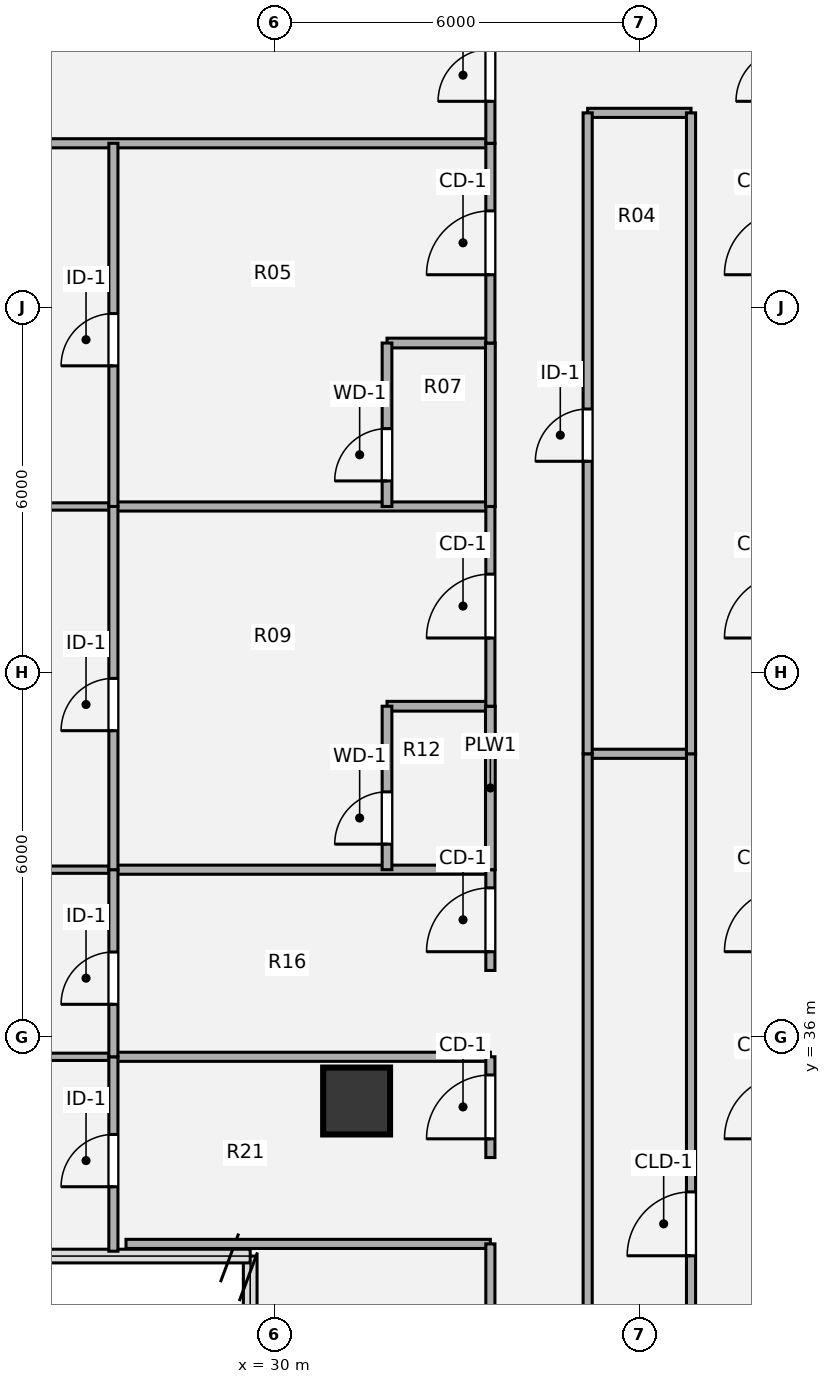
"""IFC4 building model, lengths in metres.
Left out: names, types, materials, properties, quantities, classifications, styles, units other than length and angle.
Written with IfcOpenShell. Run it as: python <this file> out.ifc"""

import sys

from ifc_helpers import new_model, si_unit, direction, frame, frame_2d, origin, origin_2d, place, context, subcontext, project, spatial, rectangle, hollow_circle, extrude, source, transform, mapped, element, fill, save


model = new_model("IFC4")
c1 = context("Model", 3, precision=1e-05, world=origin(), true_north=direction((0.0, 1.0)))
c2 = subcontext(c1, "Body", "Model", "MODEL_VIEW")
j1 = project(units=[si_unit("LENGTHUNIT", "METRE"), si_unit("PLANEANGLEUNIT", "RADIAN")], contexts=[c1])
p1 = place(None, origin())
s1 = spatial("IfcSite", under=j1, at=p1, CompositionType="ELEMENT")
p2 = place(p1, origin())
s2 = spatial("IfcBuilding", under=s1, at=p2, CompositionType="ELEMENT")
p3 = place(p2, frame((0.0, 0.0, 167.76)))
s3 = spatial("IfcBuildingStorey", under=s2, at=p3, CompositionType="ELEMENT", Elevation=167.76)
m1 = source(origin(), c2, "Body", "SweptSolid", [
    extrude(hollow_circle(Radius=0.55, WallThickness=0.04, at=origin_2d()), origin(), (0.0, 0.0, 1.0), 3.78),
])
p4 = place(p3, frame((31.35, 34.95, 0.0), z_axis=(0.0, 0.0, 1.0), x_axis=(1.0, 0.0, 0.0)))
e1 = element("IfcColumn", 1, at=p4, inside=s3, PredefinedType="COLUMN", context=c2, shape_type="MappedRepresentation", body=[
    mapped(m1, transform((0.0, 0.0, 0.0), x_axis=(1.0, 0.0, 0.0), y_axis=(0.0, 1.0, 0.0), z_axis=(0.0, 0.0, 1.0), scale=1.0)),
])
p5 = place(p3, frame((27.557, 32.6, 0.0), z_axis=(0.0, 0.0, 1.0), x_axis=(1.0, 0.0, 0.0)))
e2 = element("IfcWall", 2, at=p5, inside=s3, PredefinedType="PARTITIONING", context=c2, shape_type="SweptSolid", body=[
    extrude(rectangle(XDim=5.993, YDim=0.15, at=frame_2d((2.997, 0.0))), origin(), (0.0, 0.0, 1.0), 3.5),
])
p6 = place(p3, frame((15.88, 35.677, 0.0), z_axis=(0.0, 0.0, 1.0), x_axis=(1.0, 0.0, 0.0)))
e3 = element("IfcWall", 3, at=p6, inside=s3, PredefinedType="PARTITIONING", context=c2, shape_type="SweptSolid", body=[
    extrude(rectangle(XDim=11.47, YDim=0.12, at=frame_2d((5.735, 0.0))), origin(), (0.0, 0.0, 1.0), 2.982),
])
p7 = place(p3, frame((27.35, 35.677, 0.0), z_axis=(0.0, 0.0, 1.0), x_axis=(1.0, 0.0, 0.0)))
e4 = element("IfcWall", 4, at=p7, inside=s3, PredefinedType="PARTITIONING", context=c2, shape_type="SweptSolid", body=[
    extrude(rectangle(XDim=6.2, YDim=0.15, at=frame_2d((3.1, 0.0))), origin(), (0.0, 0.0, 1.0), 2.982),
])
p8 = place(p3, frame((15.88, 38.754, 0.0), z_axis=(0.0, 0.0, 1.0), x_axis=(1.0, 0.0, 0.0)))
e5 = element("IfcWall", 5, at=p8, inside=s3, PredefinedType="PARTITIONING", context=c2, shape_type="SweptSolid", body=[
    extrude(rectangle(XDim=11.47, YDim=0.12, at=frame_2d((5.735, 0.0))), origin(), (0.0, 0.0, 1.0), 2.982),
])
p9 = place(p3, frame((27.35, 38.754, 0.0), z_axis=(0.0, 0.0, 1.0), x_axis=(1.0, 0.0, 0.0)))
e6 = element("IfcWall", 6, at=p9, inside=s3, PredefinedType="PARTITIONING", context=c2, shape_type="SweptSolid", body=[
    extrude(rectangle(XDim=6.2, YDim=0.15, at=frame_2d((3.1, 0.0))), origin(), (0.0, 0.0, 1.0), 2.982),
])
p10 = place(p3, frame((35.15, 40.66, 0.0), z_axis=(0.0, 0.0, 1.0), x_axis=(1.0, 0.0, 0.0)))
e7 = element("IfcWall", 7, at=p10, inside=s3, PredefinedType="PARTITIONING", context=c2, shape_type="SweptSolid", body=[
    extrude(rectangle(XDim=1.7, YDim=0.15, at=frame_2d((0.85, 0.0))), origin(), (0.0, 0.0, 1.0), 3.259),
])
p11 = place(p3, frame((31.85, 41.442, 0.0), z_axis=(0.0, 0.0, 1.0), x_axis=(1.0, 0.0, 0.0)))
e8 = element("IfcWall", 8, at=p11, inside=s3, PredefinedType="PLUMBINGWALL", context=c2, shape_type="SweptSolid", body=[
    extrude(rectangle(XDim=1.7, YDim=0.16, at=frame_2d((0.85, 0.0))), origin(), (0.0, 0.0, 1.0), 3.259),
])
p12 = place(p3, frame((15.88, 44.727, 0.0), z_axis=(0.0, 0.0, 1.0), x_axis=(1.0, 0.0, 0.0)))
e9 = element("IfcWall", 9, at=p12, inside=s3, PredefinedType="PARTITIONING", context=c2, shape_type="SweptSolid", body=[
    extrude(rectangle(XDim=11.47, YDim=0.12, at=frame_2d((5.735, 0.0))), origin(), (0.0, 0.0, 1.0), 3.055),
])
p13 = place(p3, frame((27.35, 44.727, 0.0), z_axis=(0.0, 0.0, 1.0), x_axis=(1.0, 0.0, 0.0)))
e10 = element("IfcWall", 10, at=p13, inside=s3, PredefinedType="PARTITIONING", context=c2, shape_type="SweptSolid", body=[
    extrude(rectangle(XDim=6.2, YDim=0.15, at=frame_2d((3.1, 0.0))), origin(), (0.0, 0.0, 1.0), 3.055),
])
p14 = place(p3, frame((31.85, 47.415, 0.0), z_axis=(0.0, 0.0, 1.0), x_axis=(1.0, 0.0, 0.0)))
e11 = element("IfcWall", 11, at=p14, inside=s3, PredefinedType="PLUMBINGWALL", context=c2, shape_type="SweptSolid", body=[
    extrude(rectangle(XDim=1.7, YDim=0.16, at=frame_2d((0.85, 0.0))), origin(), (0.0, 0.0, 1.0), 3.259),
])
p15 = place(p3, frame((15.981, 50.7, 0.0), z_axis=(0.0, 0.0, 1.0), x_axis=(1.0, 0.0, 0.0)))
e12 = element("IfcWall", 12, at=p15, inside=s3, PredefinedType="PARTITIONING", context=c2, shape_type="SweptSolid", body=[
    extrude(rectangle(XDim=17.569, YDim=0.15, at=frame_2d((8.785, 0.0))), origin(), (0.0, 0.0, 1.0), 3.308),
])
p16 = place(p3, frame((35.15, 51.2, 0.0), z_axis=(0.0, 0.0, 1.0), x_axis=(1.0, 0.0, 0.0)))
e13 = element("IfcWall", 13, at=p16, inside=s3, PredefinedType="PARTITIONING", context=c2, shape_type="SweptSolid", body=[
    extrude(rectangle(XDim=1.7, YDim=0.15, at=frame_2d((0.85, 0.0))), origin(), (0.0, 0.0, 1.0), 3.308),
])
p17 = place(p3, frame((27.35, 32.48, 0.0), z_axis=(0.0, 0.0, 1.0), x_axis=(0.0, 1.0, 0.0)))
e14 = element("IfcWall", 14, at=p17, inside=s3, PredefinedType="PARTITIONING", context=c2, shape_type="SweptSolid", body=[
    extrude(rectangle(XDim=3.197, YDim=0.15, at=frame_2d((1.599, 0.0))), origin(), (0.0, 0.0, 1.0), 3.5),
])
p18 = place(p17, frame((1.06, 0.0, 0.0)))
e15 = element("IfcOpeningElement", 15, at=p18, cuts=e14, PredefinedType="OPENING", context=c2, shape_type="SweptSolid", body=[
    extrude(rectangle(XDim=0.86, YDim=2.1, at=origin_2d()), frame((0.43, 0.085, 1.05), z_axis=(0.0, -1.0, 0.0), x_axis=(1.0, 0.0, 0.0)), (0.0, 0.0, 1.0), 0.17),
])
p19 = place(p3, frame((27.35, 35.677, 0.0), z_axis=(0.0, 0.0, 1.0), x_axis=(0.0, 1.0, 0.0)))
e16 = element("IfcWall", 16, at=p19, inside=s3, PredefinedType="PARTITIONING", context=c2, shape_type="SweptSolid", body=[
    extrude(rectangle(XDim=3.077, YDim=0.15, at=frame_2d((1.539, 0.0))), origin(), (0.0, 0.0, 1.0), 3.5),
])
p20 = place(p19, frame((0.863, 0.0, 0.0)))
e17 = element("IfcOpeningElement", 17, at=p20, cuts=e16, PredefinedType="OPENING", context=c2, shape_type="SweptSolid", body=[
    extrude(rectangle(XDim=0.86, YDim=2.1, at=origin_2d()), frame((0.43, 0.085, 1.05), z_axis=(0.0, -1.0, 0.0), x_axis=(1.0, 0.0, 0.0)), (0.0, 0.0, 1.0), 0.17),
])
p21 = place(p3, frame((27.35, 38.754, 0.0), z_axis=(0.0, 0.0, 1.0), x_axis=(0.0, 1.0, 0.0)))
e18 = element("IfcWall", 18, at=p21, inside=s3, PredefinedType="PARTITIONING", context=c2, shape_type="SweptSolid", body=[
    extrude(rectangle(XDim=5.973, YDim=0.15, at=frame_2d((2.987, 0.0))), origin(), (0.0, 0.0, 1.0), 3.5),
])
p22 = place(p21, frame((2.286, 0.0, 0.0)))
e19 = element("IfcOpeningElement", 19, at=p22, cuts=e18, PredefinedType="OPENING", context=c2, shape_type="SweptSolid", body=[
    extrude(rectangle(XDim=0.86, YDim=2.1, at=origin_2d()), frame((0.43, 0.085, 1.05), z_axis=(0.0, -1.0, 0.0), x_axis=(1.0, 0.0, 0.0)), (0.0, 0.0, 1.0), 0.17),
])
p23 = place(p3, frame((27.35, 44.727, 0.0), z_axis=(0.0, 0.0, 1.0), x_axis=(0.0, 1.0, 0.0)))
e20 = element("IfcWall", 20, at=p23, inside=s3, PredefinedType="PARTITIONING", context=c2, shape_type="SweptSolid", body=[
    extrude(rectangle(XDim=5.973, YDim=0.15, at=frame_2d((2.986, 0.0))), origin(), (0.0, 0.0, 1.0), 3.5),
])
p24 = place(p23, frame((2.313, 0.0, 0.0)))
e21 = element("IfcOpeningElement", 21, at=p24, cuts=e20, PredefinedType="OPENING", context=c2, shape_type="SweptSolid", body=[
    extrude(rectangle(XDim=0.86, YDim=2.1, at=origin_2d()), frame((0.43, 0.085, 1.05), z_axis=(0.0, -1.0, 0.0), x_axis=(1.0, 0.0, 0.0)), (0.0, 0.0, 1.0), 0.17),
])
p25 = place(p3, frame((31.85, 38.754, 0.0), z_axis=(0.0, 0.0, 1.0), x_axis=(0.0, 1.0, 0.0)))
e22 = element("IfcWall", 22, at=p25, inside=s3, PredefinedType="PLUMBINGWALL", context=c2, shape_type="SweptSolid", body=[
    extrude(rectangle(XDim=2.688, YDim=0.16, at=frame_2d((1.344, 0.0))), origin(), (0.0, 0.0, 1.0), 3.5),
])
p26 = place(p25, frame((0.42, 0.0, 0.0)))
e23 = element("IfcOpeningElement", 23, at=p26, cuts=e22, PredefinedType="OPENING", context=c2, shape_type="SweptSolid", body=[
    extrude(rectangle(XDim=0.86, YDim=2.1, at=origin_2d()), frame((0.43, 0.09, 1.05), z_axis=(0.0, -1.0, 0.0), x_axis=(1.0, 0.0, 0.0)), (0.0, 0.0, 1.0), 0.18),
])
p27 = place(p3, frame((31.85, 44.727, 0.0), z_axis=(0.0, 0.0, 1.0), x_axis=(0.0, 1.0, 0.0)))
e24 = element("IfcWall", 24, at=p27, inside=s3, PredefinedType="PLUMBINGWALL", context=c2, shape_type="SweptSolid", body=[
    extrude(rectangle(XDim=2.688, YDim=0.16, at=frame_2d((1.344, 0.0))), origin(), (0.0, 0.0, 1.0), 3.5),
])
p28 = place(p27, frame((0.42, 0.0, 0.0)))
e25 = element("IfcOpeningElement", 25, at=p28, cuts=e24, PredefinedType="OPENING", context=c2, shape_type="SweptSolid", body=[
    extrude(rectangle(XDim=0.86, YDim=2.1, at=origin_2d()), frame((0.43, 0.09, 1.05), z_axis=(0.0, -1.0, 0.0), x_axis=(1.0, 0.0, 0.0)), (0.0, 0.0, 1.0), 0.18),
])
p29 = place(p3, frame((33.55, 22.8, 0.0), z_axis=(0.0, 0.0, 1.0), x_axis=(0.0, 1.0, 0.0)))
e26 = element("IfcWall", 26, at=p29, inside=s3, PredefinedType="PARTITIONING", context=c2, shape_type="SweptSolid", body=[
    extrude(rectangle(XDim=9.8, YDim=0.15, at=frame_2d((4.9, 0.0))), origin(), (0.0, 0.0, 1.0), 3.5),
])
p30 = place(p29, frame((4.34, 0.0, 0.0)))
e27 = element("IfcOpeningElement", 27, at=p30, cuts=e26, PredefinedType="OPENING", context=c2, shape_type="SweptSolid", body=[
    extrude(rectangle(XDim=0.86, YDim=2.1, at=origin_2d()), frame((0.43, 0.085, 1.05), z_axis=(0.0, -1.0, 0.0), x_axis=(1.0, 0.0, 0.0)), (0.0, 0.0, 1.0), 0.17),
])
p31 = place(p3, frame((33.55, 34.02, 0.0), z_axis=(0.0, 0.0, 1.0), x_axis=(0.0, 1.0, 0.0)))
e28 = element("IfcWall", 28, at=p31, inside=s3, PredefinedType="PARTITIONING", context=c2, shape_type="SweptSolid", body=[
    extrude(rectangle(XDim=1.657, YDim=0.15, at=frame_2d((0.829, 0.0))), origin(), (0.0, 0.0, 1.0), 3.5),
])
p32 = place(p31, frame((0.308, 0.0, 0.0)))
e29 = element("IfcOpeningElement", 29, at=p32, cuts=e28, PredefinedType="OPENING", context=c2, shape_type="SweptSolid", body=[
    extrude(rectangle(XDim=1.05, YDim=2.1, at=origin_2d()), frame((0.525, 0.085, 1.05), z_axis=(0.0, -1.0, 0.0), x_axis=(1.0, 0.0, 0.0)), (0.0, 0.0, 1.0), 0.17),
])
p33 = place(p3, frame((33.55, 37.097, 0.0), z_axis=(0.0, 0.0, 1.0), x_axis=(0.0, 1.0, 0.0)))
e30 = element("IfcWall", 30, at=p33, inside=s3, PredefinedType="PARTITIONING", context=c2, shape_type="SweptSolid", body=[
    extrude(rectangle(XDim=1.657, YDim=0.15, at=frame_2d((0.829, 0.0))), origin(), (0.0, 0.0, 1.0), 3.5),
])
p34 = place(p33, frame((0.308, 0.0, 0.0)))
e31 = element("IfcOpeningElement", 31, at=p34, cuts=e30, PredefinedType="OPENING", context=c2, shape_type="SweptSolid", body=[
    extrude(rectangle(XDim=1.05, YDim=2.1, at=origin_2d()), frame((0.525, 0.085, 1.05), z_axis=(0.0, -1.0, 0.0), x_axis=(1.0, 0.0, 0.0)), (0.0, 0.0, 1.0), 0.17),
])
p35 = place(p3, frame((33.55, 38.754, 0.0), z_axis=(0.0, 0.0, 1.0), x_axis=(0.0, 1.0, 0.0)))
e32 = element("IfcWall", 32, at=p35, inside=s3, PredefinedType="PLUMBINGWALL", context=c2, shape_type="SweptSolid", body=[
    extrude(rectangle(XDim=2.688, YDim=0.16, at=frame_2d((1.344, 0.0))), origin(), (0.0, 0.0, 1.0), 3.5),
])
p36 = place(p3, frame((33.55, 41.442, 0.0), z_axis=(0.0, 0.0, 1.0), x_axis=(0.0, 1.0, 0.0)))
e33 = element("IfcWall", 33, at=p36, inside=s3, PredefinedType="PARTITIONING", context=c2, shape_type="SweptSolid", body=[
    extrude(rectangle(XDim=3.285, YDim=0.15, at=frame_2d((1.643, 0.0))), origin(), (0.0, 0.0, 1.0), 3.5),
])
p37 = place(p36, frame((1.122, 0.0, 0.0)))
e34 = element("IfcOpeningElement", 34, at=p37, cuts=e33, PredefinedType="OPENING", context=c2, shape_type="SweptSolid", body=[
    extrude(rectangle(XDim=1.05, YDim=2.1, at=origin_2d()), frame((0.525, 0.085, 1.05), z_axis=(0.0, -1.0, 0.0), x_axis=(1.0, 0.0, 0.0)), (0.0, 0.0, 1.0), 0.17),
])
p38 = place(p3, frame((33.55, 44.727, 0.0), z_axis=(0.0, 0.0, 1.0), x_axis=(0.0, 1.0, 0.0)))
e35 = element("IfcWall", 35, at=p38, inside=s3, PredefinedType="PLUMBINGWALL", context=c2, shape_type="SweptSolid", body=[
    extrude(rectangle(XDim=2.688, YDim=0.16, at=frame_2d((1.344, 0.0))), origin(), (0.0, 0.0, 1.0), 3.5),
])
p39 = place(p3, frame((33.55, 47.415, 0.0), z_axis=(0.0, 0.0, 1.0), x_axis=(0.0, 1.0, 0.0)))
e36 = element("IfcWall", 36, at=p39, inside=s3, PredefinedType="PARTITIONING", context=c2, shape_type="SweptSolid", body=[
    extrude(rectangle(XDim=3.285, YDim=0.15, at=frame_2d((1.643, 0.0))), origin(), (0.0, 0.0, 1.0), 3.5),
])
p40 = place(p39, frame((1.123, 0.0, 0.0)))
e37 = element("IfcOpeningElement", 37, at=p40, cuts=e36, PredefinedType="OPENING", context=c2, shape_type="SweptSolid", body=[
    extrude(rectangle(XDim=1.05, YDim=2.1, at=origin_2d()), frame((0.525, 0.085, 1.05), z_axis=(0.0, -1.0, 0.0), x_axis=(1.0, 0.0, 0.0)), (0.0, 0.0, 1.0), 0.17),
])
p41 = place(p3, frame((33.55, 50.7, 0.0), z_axis=(0.0, 0.0, 1.0), x_axis=(0.0, 1.0, 0.0)))
e38 = element("IfcWall", 38, at=p41, inside=s3, PredefinedType="PARTITIONING", context=c2, shape_type="SweptSolid", body=[
    extrude(rectangle(XDim=2.3, YDim=0.15, at=frame_2d((1.15, 0.0))), origin(), (0.0, 0.0, 1.0), 3.5),
])
p42 = place(p41, frame((0.69, 0.0, 0.0)))
e39 = element("IfcOpeningElement", 39, at=p42, cuts=e38, PredefinedType="OPENING", context=c2, shape_type="SweptSolid", body=[
    extrude(rectangle(XDim=0.86, YDim=2.1, at=origin_2d()), frame((0.43, 0.085, 1.05), z_axis=(0.0, -1.0, 0.0), x_axis=(1.0, 0.0, 0.0)), (0.0, 0.0, 1.0), 0.17),
])
p43 = place(p3, frame((35.15, 25.2, 0.0), z_axis=(0.0, 0.0, 1.0), x_axis=(0.0, 1.0, 0.0)))
e40 = element("IfcWall", 40, at=p43, inside=s3, PredefinedType="PARTITIONING", context=c2, shape_type="SweptSolid", body=[
    extrude(rectangle(XDim=15.46, YDim=0.15, at=frame_2d((7.73, 0.0))), origin(), (0.0, 0.0, 1.0), 3.5),
])
p44 = place(p3, frame((35.15, 40.66, 0.0), z_axis=(0.0, 0.0, 1.0), x_axis=(0.0, 1.0, 0.0)))
e41 = element("IfcWall", 41, at=p44, inside=s3, PredefinedType="PARTITIONING", context=c2, shape_type="SweptSolid", body=[
    extrude(rectangle(XDim=10.54, YDim=0.15, at=frame_2d((5.27, 0.0))), origin(), (0.0, 0.0, 1.0), 3.5),
])
p45 = place(p44, frame((4.81, 0.0, 0.0)))
e42 = element("IfcOpeningElement", 42, at=p45, cuts=e41, PredefinedType="OPENING", context=c2, shape_type="SweptSolid", body=[
    extrude(rectangle(XDim=0.86, YDim=2.1, at=origin_2d()), frame((0.43, 0.085, 1.05), z_axis=(0.0, -1.0, 0.0), x_axis=(1.0, 0.0, 0.0)), (0.0, 0.0, 1.0), 0.17),
])
p46 = place(p3, frame((36.85, 25.2, 0.0), z_axis=(0.0, 0.0, 1.0), x_axis=(0.0, 1.0, 0.0)))
e43 = element("IfcWall", 43, at=p46, inside=s3, PredefinedType="PARTITIONING", context=c2, shape_type="SweptSolid", body=[
    extrude(rectangle(XDim=15.46, YDim=0.15, at=frame_2d((7.73, 0.0))), origin(), (0.0, 0.0, 1.0), 3.5),
])
p47 = place(p46, frame((7.205, 0.0, 0.0)))
e44 = element("IfcOpeningElement", 44, at=p47, cuts=e43, PredefinedType="OPENING", context=c2, shape_type="SweptSolid", body=[
    extrude(rectangle(XDim=1.05, YDim=2.1, at=origin_2d()), frame((0.525, 0.085, 1.05), z_axis=(0.0, -1.0, 0.0), x_axis=(1.0, 0.0, 0.0)), (0.0, 0.0, 1.0), 0.17),
])
p48 = place(p3, frame((36.85, 40.66, 0.0), z_axis=(0.0, 0.0, 1.0), x_axis=(0.0, 1.0, 0.0)))
e45 = element("IfcWall", 45, at=p48, inside=s3, PredefinedType="PARTITIONING", context=c2, shape_type="SweptSolid", body=[
    extrude(rectangle(XDim=10.54, YDim=0.15, at=frame_2d((5.27, 0.0))), origin(), (0.0, 0.0, 1.0), 3.5),
])
m2 = source(origin(), c2, "Body", "SweptSolid", [
    extrude(rectangle(XDim=0.86, YDim=2.1, at=origin_2d()), frame((0.43, 0.025, 1.05), z_axis=(0.0, -1.0, 0.0), x_axis=(1.0, 0.0, 0.0)), (0.0, 0.0, 1.0), 0.05),
])
p49 = place(p18, origin())
e46 = element("IfcDoor", 46, at=p49, inside=s3, OperationType="SINGLE_SWING_LEFT", PredefinedType="DOOR", context=c2, shape_type="MappedRepresentation", body=[
    mapped(m2, transform((0.0, 0.0, 0.0), x_axis=(1.0, 0.0, 0.0), y_axis=(0.0, 1.0, 0.0), z_axis=(0.0, 0.0, 1.0), scale=1.0)),
])
fill(e15, e46)
p50 = place(p20, origin())
e47 = element("IfcDoor", 47, at=p50, inside=s3, OperationType="SINGLE_SWING_LEFT", PredefinedType="DOOR", context=c2, shape_type="MappedRepresentation", body=[
    mapped(m2, transform((0.0, 0.0, 0.0), x_axis=(1.0, 0.0, 0.0), y_axis=(0.0, 1.0, 0.0), z_axis=(0.0, 0.0, 1.0), scale=1.0)),
])
fill(e17, e47)
p51 = place(p22, origin())
e48 = element("IfcDoor", 48, at=p51, inside=s3, OperationType="SINGLE_SWING_LEFT", PredefinedType="DOOR", context=c2, shape_type="MappedRepresentation", body=[
    mapped(m2, transform((0.0, 0.0, 0.0), x_axis=(1.0, 0.0, 0.0), y_axis=(0.0, 1.0, 0.0), z_axis=(0.0, 0.0, 1.0), scale=1.0)),
])
fill(e19, e48)
p52 = place(p24, origin())
e49 = element("IfcDoor", 49, at=p52, inside=s3, OperationType="SINGLE_SWING_LEFT", PredefinedType="DOOR", context=c2, shape_type="MappedRepresentation", body=[
    mapped(m2, transform((0.0, 0.0, 0.0), x_axis=(1.0, 0.0, 0.0), y_axis=(0.0, 1.0, 0.0), z_axis=(0.0, 0.0, 1.0), scale=1.0)),
])
fill(e21, e49)
m3 = source(origin(), c2, "Body", "SweptSolid", [
    extrude(rectangle(XDim=0.86, YDim=2.1, at=origin_2d()), frame((0.43, 0.025, 1.05), z_axis=(0.0, -1.0, 0.0), x_axis=(1.0, 0.0, 0.0)), (0.0, 0.0, 1.0), 0.05),
])
p53 = place(p26, origin())
e50 = element("IfcDoor", 50, at=p53, inside=s3, OperationType="SINGLE_SWING_LEFT", PredefinedType="DOOR", context=c2, shape_type="MappedRepresentation", body=[
    mapped(m3, transform((0.0, 0.0, 0.0), x_axis=(1.0, 0.0, 0.0), y_axis=(0.0, 1.0, 0.0), z_axis=(0.0, 0.0, 1.0), scale=1.0)),
])
fill(e23, e50)
p54 = place(p28, origin())
e51 = element("IfcDoor", 51, at=p54, inside=s3, OperationType="SINGLE_SWING_LEFT", PredefinedType="DOOR", context=c2, shape_type="MappedRepresentation", body=[
    mapped(m3, transform((0.0, 0.0, 0.0), x_axis=(1.0, 0.0, 0.0), y_axis=(0.0, 1.0, 0.0), z_axis=(0.0, 0.0, 1.0), scale=1.0)),
])
fill(e25, e51)
m4 = source(origin(), c2, "Body", "SweptSolid", [
    extrude(rectangle(XDim=1.05, YDim=2.1, at=origin_2d()), frame((0.525, 0.025, 1.05), z_axis=(0.0, -1.0, 0.0), x_axis=(1.0, 0.0, 0.0)), (0.0, 0.0, 1.0), 0.05),
])
p55 = place(p32, origin())
e52 = element("IfcDoor", 52, at=p55, inside=s3, OperationType="SINGLE_SWING_LEFT", PredefinedType="DOOR", context=c2, shape_type="MappedRepresentation", body=[
    mapped(m4, transform((0.0, 0.0, 0.0), x_axis=(1.0, 0.0, 0.0), y_axis=(0.0, 1.0, 0.0), z_axis=(0.0, 0.0, 1.0), scale=1.0)),
])
fill(e29, e52)
p56 = place(p34, origin())
e53 = element("IfcDoor", 53, at=p56, inside=s3, OperationType="SINGLE_SWING_LEFT", PredefinedType="DOOR", context=c2, shape_type="MappedRepresentation", body=[
    mapped(m4, transform((0.0, 0.0, 0.0), x_axis=(1.0, 0.0, 0.0), y_axis=(0.0, 1.0, 0.0), z_axis=(0.0, 0.0, 1.0), scale=1.0)),
])
fill(e31, e53)
p57 = place(p37, origin())
e54 = element("IfcDoor", 54, at=p57, inside=s3, OperationType="SINGLE_SWING_LEFT", PredefinedType="DOOR", context=c2, shape_type="MappedRepresentation", body=[
    mapped(m4, transform((0.0, 0.0, 0.0), x_axis=(1.0, 0.0, 0.0), y_axis=(0.0, 1.0, 0.0), z_axis=(0.0, 0.0, 1.0), scale=1.0)),
])
fill(e34, e54)
p58 = place(p40, origin())
e55 = element("IfcDoor", 55, at=p58, inside=s3, OperationType="SINGLE_SWING_LEFT", PredefinedType="DOOR", context=c2, shape_type="MappedRepresentation", body=[
    mapped(m4, transform((0.0, 0.0, 0.0), x_axis=(1.0, 0.0, 0.0), y_axis=(0.0, 1.0, 0.0), z_axis=(0.0, 0.0, 1.0), scale=1.0)),
])
fill(e37, e55)
p59 = place(p42, origin())
e56 = element("IfcDoor", 56, at=p59, inside=s3, OperationType="SINGLE_SWING_LEFT", PredefinedType="DOOR", context=c2, shape_type="MappedRepresentation", body=[
    mapped(m2, transform((0.0, 0.0, 0.0), x_axis=(1.0, 0.0, 0.0), y_axis=(0.0, 1.0, 0.0), z_axis=(0.0, 0.0, 1.0), scale=1.0)),
])
fill(e39, e56)
p60 = place(p45, origin())
e57 = element("IfcDoor", 57, at=p60, inside=s3, OperationType="SINGLE_SWING_LEFT", PredefinedType="DOOR", context=c2, shape_type="MappedRepresentation", body=[
    mapped(m2, transform((0.0, 0.0, 0.0), x_axis=(1.0, 0.0, 0.0), y_axis=(0.0, 1.0, 0.0), z_axis=(0.0, 0.0, 1.0), scale=1.0)),
])
fill(e42, e57)
m5 = source(origin(), c2, "Body", "SweptSolid", [
    extrude(rectangle(XDim=1.05, YDim=2.1, at=origin_2d()), frame((0.525, 0.025, 1.05), z_axis=(0.0, -1.0, 0.0), x_axis=(1.0, 0.0, 0.0)), (0.0, 0.0, 1.0), 0.05),
])
p61 = place(p47, origin())
e58 = element("IfcDoor", 58, at=p61, inside=s3, OperationType="SINGLE_SWING_LEFT", PredefinedType="DOOR", context=c2, shape_type="MappedRepresentation", body=[
    mapped(m5, transform((0.0, 0.0, 0.0), x_axis=(1.0, 0.0, 0.0), y_axis=(0.0, 1.0, 0.0), z_axis=(0.0, 0.0, 1.0), scale=1.0)),
])
fill(e44, e58)
save(model, sys.argv[1])
